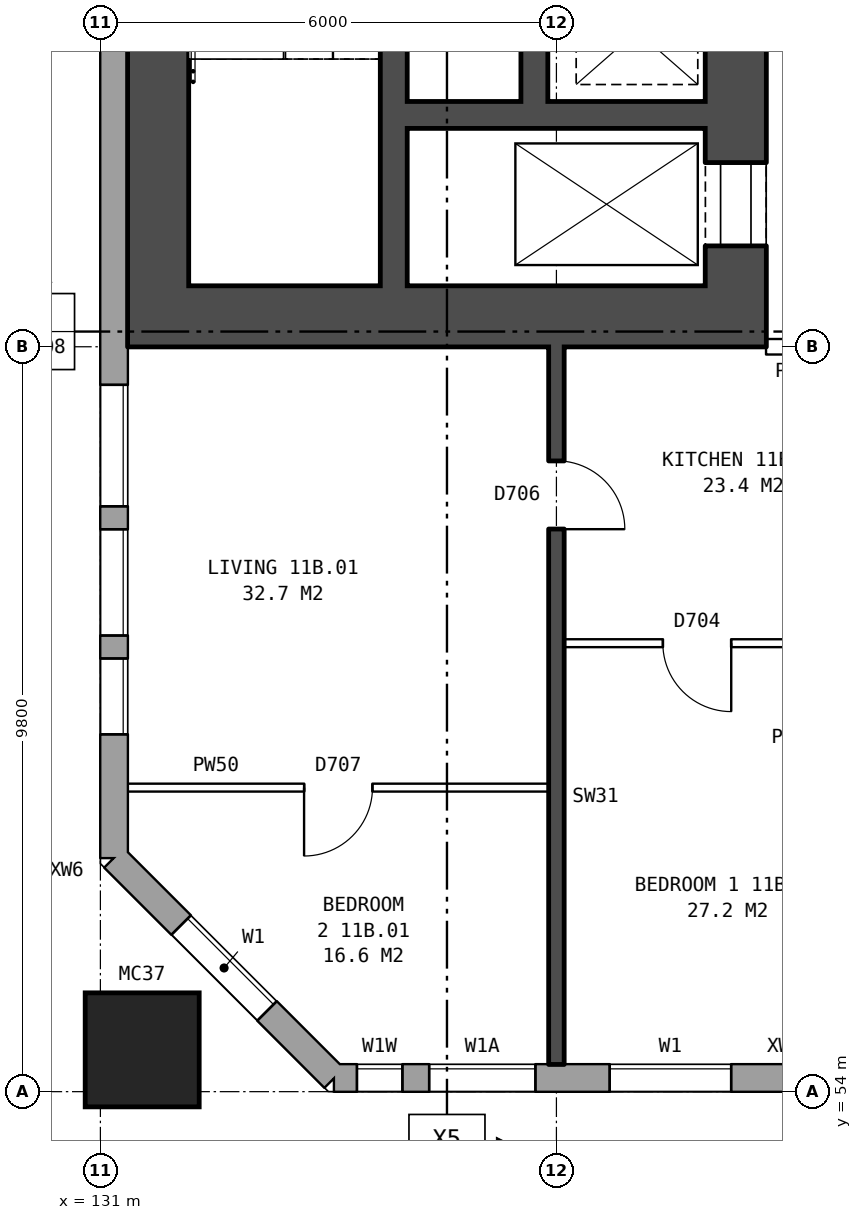
"""IFC4 building model, lengths in metres.
Left out: names, types, materials, properties, quantities, classifications, styles, units other than length and angle.
Written with IfcOpenShell. Run it as: python <this file> out.ifc"""

import sys

from ifc_helpers import new_model, si_unit, direction, frame, frame_2d, origin, origin_2d, place, context, subcontext, project, spatial, rectangle, hollow_rectangle, extrude, element, fill, save


model = new_model("IFC4")
c1 = context("Model", 3, precision=1e-05, world=origin(), true_north=direction((0.0, 1.0)))
c2 = subcontext(c1, "Body", "Model", "MODEL_VIEW")
j1 = project(units=[si_unit("LENGTHUNIT", "METRE"), si_unit("PLANEANGLEUNIT", "RADIAN")], contexts=[c1])
p1 = place(None, origin())
s1 = spatial("IfcSite", under=j1, at=p1, CompositionType="ELEMENT")
p2 = place(p1, origin())
s2 = spatial("IfcBuilding", under=s1, at=p2, CompositionType="ELEMENT")
p3 = place(p2, frame((0.0, 0.0, 44.3)))
s3 = spatial("IfcBuildingStorey", under=s2, at=p3, CompositionType="ELEMENT", Elevation=44.3)
p4 = place(p3, frame((131.55, 54.55, 0.0), z_axis=(0.0, 0.0, 1.0), x_axis=(1.0, 0.0, 0.0)))
e1 = element("IfcColumn", 1, at=p4, inside=s3, PredefinedType="COLUMN", context=c2, shape_type="SweptSolid", body=[
    extrude(hollow_rectangle(XDim=1.5, YDim=1.5, WallThickness=0.08, at=origin_2d()), origin(), (0.0, 0.0, 1.0), 3.1),
])
p5 = place(p3, frame((131.18, 57.075, 0.0), z_axis=(0.0, 0.0, 1.0), x_axis=(0.707106781187, -0.707106781187, 0.0)))
e2 = element("IfcWall", 2, at=p5, inside=s3, PredefinedType="STANDARD", context=c2, shape_type="SweptSolid", body=[
    extrude(rectangle(XDim=4.094, YDim=0.36, at=frame_2d((2.047, 0.0))), origin(), (0.0, 0.0, 1.0), 2.85),
])
p6 = place(p5, frame((1.247, 0.0, 0.8)))
e3 = element("IfcOpeningElement", 3, at=p6, cuts=e2, PredefinedType="OPENING", context=c2, shape_type="SweptSolid", body=[
    extrude(rectangle(XDim=1.6, YDim=1.8, at=frame_2d((0.8, 0.9))), frame((0.0, 0.19, 0.0), z_axis=(0.0, -1.0, 0.0), x_axis=(1.0, 0.0, 0.0)), (0.0, 0.0, 1.0), 0.38),
])
p7 = place(p3, frame((134.075, 54.18, 0.0), z_axis=(0.0, 0.0, 1.0), x_axis=(1.0, 0.0, 0.0)))
e4 = element("IfcWall", 4, at=p7, inside=s3, PredefinedType="STANDARD", context=c2, shape_type="SweptSolid", body=[
    extrude(rectangle(XDim=39.351, YDim=0.36, at=frame_2d((19.675, 0.0))), origin(), (0.0, 0.0, 1.0), 2.85),
])
p8 = place(p7, frame((0.3, 0.0, 0.8)))
e5 = element("IfcOpeningElement", 5, at=p8, cuts=e4, PredefinedType="OPENING", context=c2, shape_type="SweptSolid", body=[
    extrude(rectangle(XDim=0.6, YDim=0.9, at=frame_2d((0.3, 0.45))), frame((0.0, 0.19, 0.0), z_axis=(0.0, -1.0, 0.0), x_axis=(1.0, 0.0, 0.0)), (0.0, 0.0, 1.0), 0.38),
])
p9 = place(p7, frame((3.625, 0.0, 0.8)))
e6 = element("IfcOpeningElement", 6, at=p9, cuts=e4, PredefinedType="OPENING", context=c2, shape_type="SweptSolid", body=[
    extrude(rectangle(XDim=1.6, YDim=1.8, at=frame_2d((0.8, 0.9))), frame((0.0, 0.19, 0.0), z_axis=(0.0, -1.0, 0.0), x_axis=(1.0, 0.0, 0.0)), (0.0, 0.0, 1.0), 0.38),
])
p10 = place(p7, frame((6.625, 0.0, 0.8)))
e7 = element("IfcOpeningElement", 7, at=p10, cuts=e4, PredefinedType="OPENING", context=c2, shape_type="SweptSolid", body=[
    extrude(rectangle(XDim=1.6, YDim=1.8, at=frame_2d((0.8, 0.9))), frame((0.0, 0.19, 0.0), z_axis=(0.0, -1.0, 0.0), x_axis=(1.0, 0.0, 0.0)), (0.0, 0.0, 1.0), 0.38),
])
p11 = place(p7, frame((9.625, 0.0, 0.8)))
e8 = element("IfcOpeningElement", 8, at=p11, cuts=e4, PredefinedType="OPENING", context=c2, shape_type="SweptSolid", body=[
    extrude(rectangle(XDim=1.6, YDim=1.8, at=frame_2d((0.8, 0.9))), frame((0.0, 0.19, 0.0), z_axis=(0.0, -1.0, 0.0), x_axis=(1.0, 0.0, 0.0)), (0.0, 0.0, 1.0), 0.38),
])
p12 = place(p7, frame((12.625, 0.0, 0.8)))
e9 = element("IfcOpeningElement", 9, at=p12, cuts=e4, PredefinedType="OPENING", context=c2, shape_type="SweptSolid", body=[
    extrude(rectangle(XDim=1.6, YDim=1.8, at=frame_2d((0.8, 0.9))), frame((0.0, 0.19, 0.0), z_axis=(0.0, -1.0, 0.0), x_axis=(1.0, 0.0, 0.0)), (0.0, 0.0, 1.0), 0.38),
])
p13 = place(p7, frame((15.625, 0.0, 0.8)))
e10 = element("IfcOpeningElement", 10, at=p13, cuts=e4, PredefinedType="OPENING", context=c2, shape_type="SweptSolid", body=[
    extrude(rectangle(XDim=1.6, YDim=1.8, at=frame_2d((0.8, 0.9))), frame((0.0, 0.19, 0.0), z_axis=(0.0, -1.0, 0.0), x_axis=(1.0, 0.0, 0.0)), (0.0, 0.0, 1.0), 0.38),
])
p14 = place(p7, frame((18.625, 0.0, 0.8)))
e11 = element("IfcOpeningElement", 11, at=p14, cuts=e4, PredefinedType="OPENING", context=c2, shape_type="SweptSolid", body=[
    extrude(rectangle(XDim=1.6, YDim=1.8, at=frame_2d((0.8, 0.9))), frame((0.0, 0.19, 0.0), z_axis=(0.0, -1.0, 0.0), x_axis=(1.0, 0.0, 0.0)), (0.0, 0.0, 1.0), 0.38),
])
p15 = place(p7, frame((21.625, 0.0, 0.8)))
e12 = element("IfcOpeningElement", 12, at=p15, cuts=e4, PredefinedType="OPENING", context=c2, shape_type="SweptSolid", body=[
    extrude(rectangle(XDim=1.6, YDim=1.8, at=frame_2d((0.8, 0.9))), frame((0.0, 0.19, 0.0), z_axis=(0.0, -1.0, 0.0), x_axis=(1.0, 0.0, 0.0)), (0.0, 0.0, 1.0), 0.38),
])
p16 = place(p7, frame((24.625, 0.0, 0.8)))
e13 = element("IfcOpeningElement", 13, at=p16, cuts=e4, PredefinedType="OPENING", context=c2, shape_type="SweptSolid", body=[
    extrude(rectangle(XDim=1.6, YDim=1.8, at=frame_2d((0.8, 0.9))), frame((0.0, 0.19, 0.0), z_axis=(0.0, -1.0, 0.0), x_axis=(1.0, 0.0, 0.0)), (0.0, 0.0, 1.0), 0.38),
])
p17 = place(p7, frame((27.625, 0.0, 0.8)))
e14 = element("IfcOpeningElement", 14, at=p17, cuts=e4, PredefinedType="OPENING", context=c2, shape_type="SweptSolid", body=[
    extrude(rectangle(XDim=1.6, YDim=1.8, at=frame_2d((0.8, 0.9))), frame((0.0, 0.19, 0.0), z_axis=(0.0, -1.0, 0.0), x_axis=(1.0, 0.0, 0.0)), (0.0, 0.0, 1.0), 0.38),
])
p18 = place(p7, frame((30.625, 0.0, 0.8)))
e15 = element("IfcOpeningElement", 15, at=p18, cuts=e4, PredefinedType="OPENING", context=c2, shape_type="SweptSolid", body=[
    extrude(rectangle(XDim=1.6, YDim=1.8, at=frame_2d((0.8, 0.9))), frame((0.0, 0.19, 0.0), z_axis=(0.0, -1.0, 0.0), x_axis=(1.0, 0.0, 0.0)), (0.0, 0.0, 1.0), 0.38),
])
p19 = place(p7, frame((33.625, 0.0, 0.8)))
e16 = element("IfcOpeningElement", 16, at=p19, cuts=e4, PredefinedType="OPENING", context=c2, shape_type="SweptSolid", body=[
    extrude(rectangle(XDim=1.6, YDim=1.8, at=frame_2d((0.8, 0.9))), frame((0.0, 0.19, 0.0), z_axis=(0.0, -1.0, 0.0), x_axis=(1.0, 0.0, 0.0)), (0.0, 0.0, 1.0), 0.38),
])
p20 = place(p7, frame((36.625, 0.0, 0.8)))
e17 = element("IfcOpeningElement", 17, at=p20, cuts=e4, PredefinedType="OPENING", context=c2, shape_type="SweptSolid", body=[
    extrude(rectangle(XDim=1.6, YDim=1.8, at=frame_2d((0.8, 0.9))), frame((0.0, 0.19, 0.0), z_axis=(0.0, -1.0, 0.0), x_axis=(1.0, 0.0, 0.0)), (0.0, 0.0, 1.0), 0.38),
])
p21 = place(p7, frame((1.25, 0.0, 0.8)))
e18 = element("IfcOpeningElement", 18, at=p21, cuts=e4, PredefinedType="OPENING", context=c2, shape_type="SweptSolid", body=[
    extrude(rectangle(XDim=1.4, YDim=1.8, at=frame_2d((0.7, 0.9))), frame((0.0, 0.19, 0.0), z_axis=(0.0, -1.0, 0.0), x_axis=(1.0, 0.0, 0.0)), (0.0, 0.0, 1.0), 0.38),
])
p22 = place(p3, frame((131.18, 82.925, 0.0), z_axis=(0.0, 0.0, 1.0), x_axis=(0.0, -1.0, 0.0)))
e19 = element("IfcWall", 19, at=p22, inside=s3, PredefinedType="STANDARD", context=c2, shape_type="SweptSolid", body=[
    extrude(rectangle(XDim=25.851, YDim=0.36, at=frame_2d((12.925, 0.0))), origin(), (0.0, 0.0, 1.0), 2.85),
])
p23 = place(p22, frame((1.475, 0.0, 0.8)))
e20 = element("IfcOpeningElement", 20, at=p23, cuts=e19, PredefinedType="OPENING", context=c2, shape_type="SweptSolid", body=[
    extrude(rectangle(XDim=1.0, YDim=1.2, at=frame_2d((0.5, 0.6))), frame((0.0, 0.19, 0.0), z_axis=(0.0, -1.0, 0.0), x_axis=(1.0, 0.0, 0.0)), (0.0, 0.0, 1.0), 0.38),
])
p24 = place(p22, frame((4.625, 0.0, 0.8)))
e21 = element("IfcOpeningElement", 21, at=p24, cuts=e19, PredefinedType="OPENING", context=c2, shape_type="SweptSolid", body=[
    extrude(rectangle(XDim=1.6, YDim=1.8, at=frame_2d((0.8, 0.9))), frame((0.0, 0.19, 0.0), z_axis=(0.0, -1.0, 0.0), x_axis=(1.0, 0.0, 0.0)), (0.0, 0.0, 1.0), 0.38),
])
p25 = place(p22, frame((19.625, 0.0, 0.8)))
e22 = element("IfcOpeningElement", 22, at=p25, cuts=e19, PredefinedType="OPENING", context=c2, shape_type="SweptSolid", body=[
    extrude(rectangle(XDim=1.6, YDim=1.8, at=frame_2d((0.8, 0.9))), frame((0.0, 0.19, 0.0), z_axis=(0.0, -1.0, 0.0), x_axis=(1.0, 0.0, 0.0)), (0.0, 0.0, 1.0), 0.38),
])
p26 = place(p22, frame((21.525, 0.0, 0.8)))
e23 = element("IfcOpeningElement", 23, at=p26, cuts=e19, PredefinedType="OPENING", context=c2, shape_type="SweptSolid", body=[
    extrude(rectangle(XDim=1.4, YDim=1.8, at=frame_2d((0.7, 0.9))), frame((0.0, 0.19, 0.0), z_axis=(0.0, -1.0, 0.0), x_axis=(1.0, 0.0, 0.0)), (0.0, 0.0, 1.0), 0.38),
])
p27 = place(p22, frame((2.775, 0.0, 0.8)))
e24 = element("IfcOpeningElement", 24, at=p27, cuts=e19, PredefinedType="OPENING", context=c2, shape_type="SweptSolid", body=[
    extrude(rectangle(XDim=1.4, YDim=1.8, at=frame_2d((0.7, 0.9))), frame((0.0, 0.19, 0.0), z_axis=(0.0, -1.0, 0.0), x_axis=(1.0, 0.0, 0.0)), (0.0, 0.0, 1.0), 0.38),
])
p28 = place(p22, frame((23.225, 0.0, 0.8)))
e25 = element("IfcOpeningElement", 25, at=p28, cuts=e19, PredefinedType="OPENING", context=c2, shape_type="SweptSolid", body=[
    extrude(rectangle(XDim=1.0, YDim=1.2, at=frame_2d((0.5, 0.6))), frame((0.0, 0.19, 0.0), z_axis=(0.0, -1.0, 0.0), x_axis=(1.0, 0.0, 0.0)), (0.0, 0.0, 1.0), 0.38),
])
p29 = place(p3, frame((139.36, 64.6, 0.0), z_axis=(0.0, 0.0, 1.0), x_axis=(0.0, 1.0, 0.0)))
e26 = element("IfcWall", 26, at=p29, inside=s3, PredefinedType="SHEAR", context=c2, shape_type="SweptSolid", body=[
    extrude(rectangle(XDim=10.8, YDim=0.8, at=frame_2d((5.4, 0.0))), origin(), (0.0, 0.0, 1.0), 2.85),
])
p30 = place(p29, frame((0.525, 0.0, 0.0)))
e27 = element("IfcOpeningElement", 27, at=p30, cuts=e26, PredefinedType="OPENING", context=c2, shape_type="SweptSolid", body=[
    extrude(rectangle(XDim=1.1, YDim=2.1, at=frame_2d((0.55, 1.05))), frame((0.0, 0.41, 0.0), z_axis=(0.0, -1.0, 0.0), x_axis=(1.0, 0.0, 0.0)), (0.0, 0.0, 1.0), 0.82),
])
p31 = place(p29, frame((9.1, 0.0, 0.0)))
e28 = element("IfcOpeningElement", 28, at=p31, cuts=e26, PredefinedType="OPENING", context=c2, shape_type="SweptSolid", body=[
    extrude(rectangle(XDim=1.1, YDim=2.1, at=frame_2d((0.55, 1.05))), frame((0.0, 0.41, 0.0), z_axis=(0.0, -1.0, 0.0), x_axis=(1.0, 0.0, 0.0)), (0.0, 0.0, 1.0), 0.82),
])
p32 = place(p29, frame((7.325, 0.0, 0.0)))
e29 = element("IfcOpeningElement", 29, at=p32, cuts=e26, PredefinedType="OPENING", context=c2, shape_type="SweptSolid", body=[
    extrude(rectangle(XDim=0.85, YDim=2.1, at=frame_2d((0.425, 1.05))), frame((0.0, 0.41, 0.0), z_axis=(0.0, -1.0, 0.0), x_axis=(1.0, 0.0, 0.0)), (0.0, 0.0, 1.0), 0.82),
])
p33 = place(p3, frame((131.76, 64.6, 0.0), z_axis=(0.0, 0.0, 1.0), x_axis=(0.0, 1.0, 0.0)))
e30 = element("IfcWall", 30, at=p33, inside=s3, PredefinedType="SHEAR", context=c2, shape_type="SweptSolid", body=[
    extrude(rectangle(XDim=10.8, YDim=0.8, at=frame_2d((5.4, 0.0))), origin(), (0.0, 0.0, 1.0), 2.85),
])
p34 = place(p3, frame((139.76, 64.2, 0.0), z_axis=(0.0, 0.0, 1.0), x_axis=(-1.0, 0.0, 0.0)))
e31 = element("IfcWall", 31, at=p34, inside=s3, PredefinedType="SHEAR", context=c2, shape_type="SweptSolid", body=[
    extrude(rectangle(XDim=8.4, YDim=0.8, at=frame_2d((4.2, 0.0))), origin(), (0.0, 0.0, 1.0), 2.85),
])
p35 = place(p3, frame((138.96, 66.85, 0.0), z_axis=(0.0, 0.0, 1.0), x_axis=(-1.0, 0.0, 0.0)))
e32 = element("IfcWall", 32, at=p35, inside=s3, PredefinedType="SHEAR", context=c2, shape_type="SweptSolid", body=[
    extrude(rectangle(XDim=3.925, YDim=0.35, at=frame_2d((1.962, 0.0))), origin(), (0.0, 0.0, 1.0), 2.85),
])
p36 = place(p3, frame((136.71, 67.025, 0.0), z_axis=(0.0, 0.0, 1.0), x_axis=(0.0, 1.0, 0.0)))
e33 = element("IfcWall", 33, at=p36, inside=s3, PredefinedType="SHEAR", context=c2, shape_type="SweptSolid", body=[
    extrude(rectangle(XDim=4.05, YDim=0.35, at=frame_2d((2.025, 0.0))), origin(), (0.0, 0.0, 1.0), 2.85),
])
p37 = place(p3, frame((134.86, 64.6, 0.0), z_axis=(0.0, 0.0, 1.0), x_axis=(0.0, 1.0, 0.0)))
e34 = element("IfcWall", 34, at=p37, inside=s3, PredefinedType="SHEAR", context=c2, shape_type="SweptSolid", body=[
    extrude(rectangle(XDim=6.475, YDim=0.35, at=frame_2d((3.237, 0.0))), origin(), (0.0, 0.0, 1.0), 2.85),
])
p38 = place(p3, frame((131.36, 58.0, 0.0), z_axis=(0.0, 0.0, 1.0), x_axis=(1.0, 0.0, 0.0)))
e35 = element("IfcWall", 35, at=p38, inside=s3, PredefinedType="PARTITIONING", context=c2, shape_type="SweptSolid", body=[
    extrude(rectangle(XDim=5.54, YDim=0.1, at=frame_2d((2.77, 0.0))), origin(), (0.0, 0.0, 1.0), 2.85),
])
p39 = place(p38, frame((2.32, 0.0, 0.0)))
e36 = element("IfcOpeningElement", 36, at=p39, cuts=e35, PredefinedType="OPENING", context=c2, shape_type="SweptSolid", body=[
    extrude(rectangle(XDim=0.9, YDim=2.1, at=frame_2d((0.45, 1.05))), frame((0.0, 0.06, 0.0), z_axis=(0.0, -1.0, 0.0), x_axis=(1.0, 0.0, 0.0)), (0.0, 0.0, 1.0), 0.12),
])
p40 = place(p3, frame((137.1, 59.9, 0.0), z_axis=(0.0, 0.0, 1.0), x_axis=(1.0, 0.0, 0.0)))
e37 = element("IfcWall", 37, at=p40, inside=s3, PredefinedType="PARTITIONING", context=c2, shape_type="SweptSolid", body=[
    extrude(rectangle(XDim=5.8, YDim=0.1, at=frame_2d((2.9, 0.0))), origin(), (0.0, 0.0, 1.0), 2.85),
])
p41 = place(p40, frame((1.3, 0.0, 0.0)))
e38 = element("IfcOpeningElement", 38, at=p41, cuts=e37, PredefinedType="OPENING", context=c2, shape_type="SweptSolid", body=[
    extrude(rectangle(XDim=0.9, YDim=2.1, at=frame_2d((0.45, 1.05))), frame((0.0, 0.06, 0.0), z_axis=(0.0, -1.0, 0.0), x_axis=(1.0, 0.0, 0.0)), (0.0, 0.0, 1.0), 0.12),
])
p42 = place(p40, frame((4.2, 0.0, 0.0)))
e39 = element("IfcOpeningElement", 39, at=p42, cuts=e37, PredefinedType="OPENING", context=c2, shape_type="SweptSolid", body=[
    extrude(rectangle(XDim=0.9, YDim=2.1, at=frame_2d((0.45, 1.05))), frame((0.0, 0.06, 0.0), z_axis=(0.0, -1.0, 0.0), x_axis=(1.0, 0.0, 0.0)), (0.0, 0.0, 1.0), 0.12),
])
p43 = place(p3, frame((139.76, 63.8, 0.0), z_axis=(0.0, 0.0, 1.0), x_axis=(1.0, 0.0, 0.0)))
e40 = element("IfcWall", 40, at=p43, inside=s3, PredefinedType="PARTITIONING", context=c2, shape_type="SweptSolid", body=[
    extrude(rectangle(XDim=3.0, YDim=0.2, at=frame_2d((1.5, 0.0))), origin(), (0.0, 0.0, 1.0), 2.85),
])
p44 = place(p43, frame((1.0, 0.0, 0.0)))
e41 = element("IfcOpeningElement", 41, at=p44, cuts=e40, PredefinedType="OPENING", context=c2, shape_type="SweptSolid", body=[
    extrude(rectangle(XDim=1.0, YDim=2.1, at=frame_2d((0.5, 1.05))), frame((0.0, 0.11, 0.0), z_axis=(0.0, -1.0, 0.0), x_axis=(1.0, 0.0, 0.0)), (0.0, 0.0, 1.0), 0.22),
])
p45 = place(p3, frame((137.0, 54.36, 0.0), z_axis=(0.0, 0.0, 1.0), x_axis=(0.0, 1.0, 0.0)))
e42 = element("IfcWall", 42, at=p45, inside=s3, PredefinedType="SOLIDWALL", context=c2, shape_type="SweptSolid", body=[
    extrude(rectangle(XDim=9.44, YDim=0.2, at=frame_2d((4.72, 0.0))), origin(), (0.0, 0.0, 1.0), 2.85),
])
p46 = place(p45, frame((7.04, 0.0, 0.0)))
e43 = element("IfcOpeningElement", 43, at=p46, cuts=e42, PredefinedType="OPENING", context=c2, shape_type="SweptSolid", body=[
    extrude(rectangle(XDim=0.9, YDim=2.1, at=frame_2d((0.45, 1.05))), frame((0.0, 0.11, 0.0), z_axis=(0.0, -1.0, 0.0), x_axis=(1.0, 0.0, 0.0)), (0.0, 0.0, 1.0), 0.22),
])
p47 = place(p6, origin())
e44 = element("IfcWindow", 44, at=p47, inside=s3, PartitioningType="SINGLE_PANEL", PredefinedType="WINDOW", context=c2, shape_type="SweptSolid", body=[
    extrude(rectangle(XDim=1.6, YDim=1.8, at=frame_2d((0.8, 0.9))), frame((0.0, 0.15, 0.0), z_axis=(0.0, -1.0, 0.0), x_axis=(1.0, 0.0, 0.0)), (0.0, 0.0, 1.0), 0.06),
])
fill(e3, e44)
p48 = place(p8, origin())
e45 = element("IfcWindow", 45, at=p48, inside=s3, PartitioningType="SINGLE_PANEL", PredefinedType="WINDOW", context=c2, shape_type="SweptSolid", body=[
    extrude(rectangle(XDim=0.6, YDim=0.9, at=frame_2d((0.3, 0.45))), frame((0.0, 0.15, 0.0), z_axis=(0.0, -1.0, 0.0), x_axis=(1.0, 0.0, 0.0)), (0.0, 0.0, 1.0), 0.06),
])
fill(e5, e45)
p49 = place(p9, origin())
e46 = element("IfcWindow", 46, at=p49, inside=s3, PartitioningType="SINGLE_PANEL", PredefinedType="WINDOW", context=c2, shape_type="SweptSolid", body=[
    extrude(rectangle(XDim=1.6, YDim=1.8, at=frame_2d((0.8, 0.9))), frame((0.0, 0.15, 0.0), z_axis=(0.0, -1.0, 0.0), x_axis=(1.0, 0.0, 0.0)), (0.0, 0.0, 1.0), 0.06),
])
fill(e6, e46)
p50 = place(p25, origin())
e47 = element("IfcWindow", 47, at=p50, inside=s3, PartitioningType="SINGLE_PANEL", PredefinedType="WINDOW", context=c2, shape_type="SweptSolid", body=[
    extrude(rectangle(XDim=1.6, YDim=1.8, at=frame_2d((0.8, 0.9))), frame((0.0, 0.15, 0.0), z_axis=(0.0, -1.0, 0.0), x_axis=(1.0, 0.0, 0.0)), (0.0, 0.0, 1.0), 0.06),
])
fill(e22, e47)
p51 = place(p26, origin())
e48 = element("IfcWindow", 48, at=p51, inside=s3, PartitioningType="SINGLE_PANEL", PredefinedType="WINDOW", context=c2, shape_type="SweptSolid", body=[
    extrude(rectangle(XDim=1.4, YDim=1.8, at=frame_2d((0.7, 0.9))), frame((0.0, 0.15, 0.0), z_axis=(0.0, -1.0, 0.0), x_axis=(1.0, 0.0, 0.0)), (0.0, 0.0, 1.0), 0.06),
])
fill(e23, e48)
p52 = place(p30, origin())
e49 = element("IfcDoor", 49, at=p52, inside=s3, OperationType="DOUBLE_DOOR_SLIDING", PredefinedType="DOOR", context=c2, shape_type="SweptSolid", body=[
    extrude(rectangle(XDim=1.1, YDim=2.1, at=frame_2d((0.55, 1.05))), frame((0.0, 0.385, 0.0), z_axis=(0.0, -1.0, 0.0), x_axis=(1.0, 0.0, 0.0)), (0.0, 0.0, 1.0), 0.05),
])
fill(e27, e49)
p53 = place(p41, frame((0.9, 0.0, 0.0), z_axis=(0.0, 0.0, 1.0), x_axis=(-1.0, 0.0, 0.0)))
e50 = element("IfcDoor", 50, at=p53, inside=s3, OperationType="SINGLE_SWING_LEFT", PredefinedType="DOOR", context=c2, shape_type="SweptSolid", body=[
    extrude(rectangle(XDim=0.9, YDim=2.1, at=frame_2d((0.45, 1.05))), frame((0.0, 0.025, 0.0), z_axis=(0.0, -1.0, 0.0), x_axis=(1.0, 0.0, 0.0)), (0.0, 0.0, 1.0), 0.05),
])
fill(e38, e50)
p54 = place(p39, frame((0.9, 0.0, 0.0), z_axis=(0.0, 0.0, 1.0), x_axis=(-1.0, 0.0, 0.0)))
e51 = element("IfcDoor", 51, at=p54, inside=s3, OperationType="SINGLE_SWING_RIGHT", PredefinedType="DOOR", context=c2, shape_type="SweptSolid", body=[
    extrude(rectangle(XDim=0.9, YDim=2.1, at=frame_2d((0.45, 1.05))), frame((0.0, 0.025, 0.0), z_axis=(0.0, -1.0, 0.0), x_axis=(1.0, 0.0, 0.0)), (0.0, 0.0, 1.0), 0.05),
])
fill(e36, e51)
p55 = place(p46, frame((0.9, 0.0, 0.0), z_axis=(0.0, 0.0, 1.0), x_axis=(-1.0, 0.0, 0.0)))
e52 = element("IfcDoor", 52, at=p55, inside=s3, OperationType="SINGLE_SWING_RIGHT", PredefinedType="DOOR", context=c2, shape_type="SweptSolid", body=[
    extrude(rectangle(XDim=0.9, YDim=2.1, at=frame_2d((0.45, 1.05))), frame((0.0, 0.025, 0.0), z_axis=(0.0, -1.0, 0.0), x_axis=(1.0, 0.0, 0.0)), (0.0, 0.0, 1.0), 0.05),
])
fill(e43, e52)
p56 = place(p21, origin())
e53 = element("IfcWindow", 53, at=p56, inside=s3, PartitioningType="SINGLE_PANEL", PredefinedType="WINDOW", context=c2, shape_type="SweptSolid", body=[
    extrude(rectangle(XDim=1.4, YDim=1.8, at=frame_2d((0.7, 0.9))), frame((0.0, 0.15, 0.0), z_axis=(0.0, -1.0, 0.0), x_axis=(1.0, 0.0, 0.0)), (0.0, 0.0, 1.0), 0.06),
])
fill(e18, e53)
p57 = place(p28, origin())
e54 = element("IfcWindow", 54, at=p57, inside=s3, PartitioningType="SINGLE_PANEL", PredefinedType="WINDOW", context=c2, shape_type="SweptSolid", body=[
    extrude(rectangle(XDim=1.0, YDim=1.2, at=frame_2d((0.5, 0.6))), frame((0.0, 0.15, 0.0), z_axis=(0.0, -1.0, 0.0), x_axis=(1.0, 0.0, 0.0)), (0.0, 0.0, 1.0), 0.06),
])
fill(e25, e54)
save(model, sys.argv[1])
